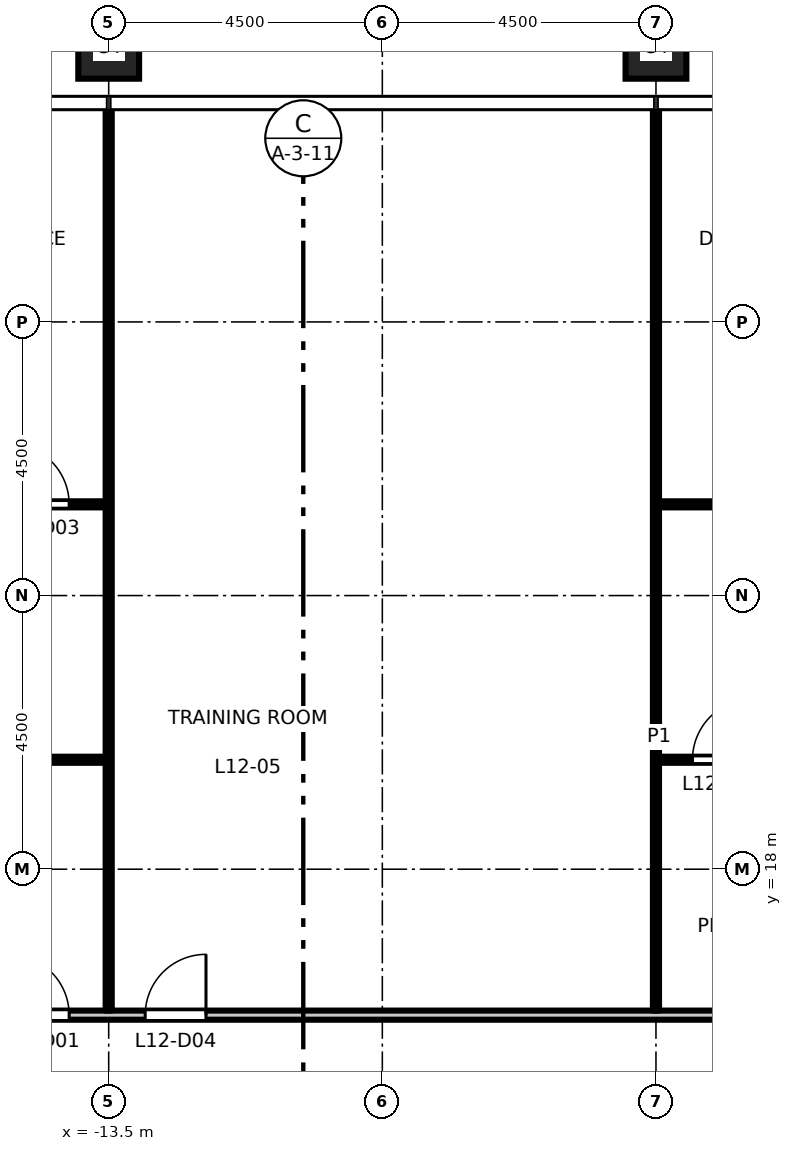
"""IFC4 building model, lengths in metres.
Left out: names, types, materials, properties, quantities, classifications, styles, units other than length and angle.
Written with IfcOpenShell. Run it as: python <this file> out.ifc"""

import sys

from ifc_helpers import new_model, si_unit, direction, frame, frame_2d, origin, origin_2d, place, context, subcontext, project, spatial, rectangle, hollow_rectangle, extrude, element, fill, save


model = new_model("IFC4")
c1 = context("Model", 3, precision=1e-05, world=origin(), true_north=direction((0.0, 1.0)))
c2 = subcontext(c1, "Body", "Model", "MODEL_VIEW")
j1 = project(units=[si_unit("LENGTHUNIT", "METRE"), si_unit("PLANEANGLEUNIT", "RADIAN")], contexts=[c1])
p1 = place(None, origin())
s1 = spatial("IfcSite", under=j1, at=p1, CompositionType="ELEMENT")
p2 = place(p1, origin())
s2 = spatial("IfcBuilding", under=s1, at=p2, CompositionType="ELEMENT")
p3 = place(p2, frame((0.0, 0.0, 58.2)))
s3 = spatial("IfcBuildingStorey", under=s2, at=p3, CompositionType="ELEMENT", Elevation=58.2)
for number, where, z_axis, x_axis in (
    (1, (-4.5, 31.5, 0.0), (0.0, 0.0, 1.0), (1.0, 0.0, 0.0)),
    (2, (-13.5, 31.5, 0.0), (0.0, 0.0, 1.0), (1.0, 0.0, 0.0)),
):
    element("IfcColumn", number, at=place(p3, frame(where, z_axis=z_axis, x_axis=x_axis)), inside=s3, PredefinedType="COLUMN", context=c2, shape_type="SweptSolid", body=[
        extrude(hollow_rectangle(XDim=1.0, YDim=1.0, WallThickness=0.06, at=origin_2d()), origin(), (0.0, 0.0, 1.0), 4.5),
    ])
p4 = place(p3, frame((-23.925, 15.6, 0.0), z_axis=(0.0, 0.0, 1.0), x_axis=(1.0, 0.0, 0.0)))
e3 = element("IfcWall", 3, at=p4, inside=s3, PredefinedType="PARTITIONING", context=c2, shape_type="SweptSolid", body=[
    extrude(rectangle(XDim=47.85, YDim=0.15, at=frame_2d((23.925, 0.0))), origin(), (0.0, 0.0, 1.0), 4.35),
])
p5 = place(p4, frame((8.775, 0.0, 0.0)))
e4 = element("IfcOpeningElement", 4, at=p5, cuts=e3, PredefinedType="OPENING", context=c2, shape_type="SweptSolid", body=[
    extrude(rectangle(XDim=1.0, YDim=2.1, at=frame_2d((0.5, 1.05))), frame((0.0, 0.085, 0.0), z_axis=(0.0, -1.0, 0.0), x_axis=(1.0, 0.0, 0.0)), (0.0, 0.0, 1.0), 0.17),
])
p6 = place(p4, frame((11.025, 0.0, 0.0)))
e5 = element("IfcOpeningElement", 5, at=p6, cuts=e3, PredefinedType="OPENING", context=c2, shape_type="SweptSolid", body=[
    extrude(rectangle(XDim=1.0, YDim=2.1, at=frame_2d((0.5, 1.05))), frame((0.0, 0.085, 0.0), z_axis=(0.0, -1.0, 0.0), x_axis=(1.0, 0.0, 0.0)), (0.0, 0.0, 1.0), 0.17),
])
p7 = place(p4, frame((26.775, 0.0, 0.0)))
e6 = element("IfcOpeningElement", 6, at=p7, cuts=e3, PredefinedType="OPENING", context=c2, shape_type="SweptSolid", body=[
    extrude(rectangle(XDim=1.0, YDim=2.1, at=frame_2d((0.5, 1.05))), frame((0.0, 0.085, 0.0), z_axis=(0.0, -1.0, 0.0), x_axis=(1.0, 0.0, 0.0)), (0.0, 0.0, 1.0), 0.17),
])
p8 = place(p4, frame((29.025, 0.0, 0.0)))
e7 = element("IfcOpeningElement", 7, at=p8, cuts=e3, PredefinedType="OPENING", context=c2, shape_type="SweptSolid", body=[
    extrude(rectangle(XDim=1.0, YDim=2.1, at=frame_2d((0.5, 1.05))), frame((0.0, 0.085, 0.0), z_axis=(0.0, -1.0, 0.0), x_axis=(1.0, 0.0, 0.0)), (0.0, 0.0, 1.0), 0.17),
])
p9 = place(p4, frame((38.025, 0.0, 0.0)))
e8 = element("IfcOpeningElement", 8, at=p9, cuts=e3, PredefinedType="OPENING", context=c2, shape_type="SweptSolid", body=[
    extrude(rectangle(XDim=1.0, YDim=2.1, at=frame_2d((0.5, 1.05))), frame((0.0, 0.085, 0.0), z_axis=(0.0, -1.0, 0.0), x_axis=(1.0, 0.0, 0.0)), (0.0, 0.0, 1.0), 0.17),
])
p10 = place(p3, frame((-22.45, 19.8, 0.0), z_axis=(0.0, 0.0, 1.0), x_axis=(1.0, 0.0, 0.0)))
e9 = element("IfcWall", 9, at=p10, inside=s3, PredefinedType="PARTITIONING", context=c2, shape_type="SweptSolid", body=[
    extrude(rectangle(XDim=8.9, YDim=0.1, at=frame_2d((4.45, 0.0))), origin(), (0.0, 0.0, 1.0), 4.35),
])
p11 = place(p10, frame((0.55, 0.0, 0.0)))
e10 = element("IfcOpeningElement", 10, at=p11, cuts=e9, PredefinedType="OPENING", context=c2, shape_type="SweptSolid", body=[
    extrude(rectangle(XDim=1.0, YDim=2.1, at=frame_2d((0.5, 1.05))), frame((0.0, 0.06, 0.0), z_axis=(0.0, -1.0, 0.0), x_axis=(1.0, 0.0, 0.0)), (0.0, 0.0, 1.0), 0.12),
])
p12 = place(p3, frame((-4.45, 19.8, 0.0), z_axis=(0.0, 0.0, 1.0), x_axis=(1.0, 0.0, 0.0)))
e11 = element("IfcWall", 11, at=p12, inside=s3, PredefinedType="PARTITIONING", context=c2, shape_type="SweptSolid", body=[
    extrude(rectangle(XDim=26.9, YDim=0.1, at=frame_2d((13.45, 0.0))), origin(), (0.0, 0.0, 1.0), 4.35),
])
p13 = place(p12, frame((0.55, 0.0, 0.0)))
e12 = element("IfcOpeningElement", 12, at=p13, cuts=e11, PredefinedType="OPENING", context=c2, shape_type="SweptSolid", body=[
    extrude(rectangle(XDim=1.0, YDim=2.1, at=frame_2d((0.5, 1.05))), frame((0.0, 0.06, 0.0), z_axis=(0.0, -1.0, 0.0), x_axis=(1.0, 0.0, 0.0)), (0.0, 0.0, 1.0), 0.12),
])
p14 = place(p12, frame((16.3, 0.0, 0.0)))
e13 = element("IfcOpeningElement", 13, at=p14, cuts=e11, PredefinedType="OPENING", context=c2, shape_type="SweptSolid", body=[
    extrude(rectangle(XDim=1.0, YDim=2.1, at=frame_2d((0.5, 1.05))), frame((0.0, 0.06, 0.0), z_axis=(0.0, -1.0, 0.0), x_axis=(1.0, 0.0, 0.0)), (0.0, 0.0, 1.0), 0.12),
])
p15 = place(p12, frame((25.3, 0.0, 0.0)))
e14 = element("IfcOpeningElement", 14, at=p15, cuts=e11, PredefinedType="OPENING", context=c2, shape_type="SweptSolid", body=[
    extrude(rectangle(XDim=1.0, YDim=2.1, at=frame_2d((0.5, 1.05))), frame((0.0, 0.06, 0.0), z_axis=(0.0, -1.0, 0.0), x_axis=(1.0, 0.0, 0.0)), (0.0, 0.0, 1.0), 0.12),
])
p16 = place(p3, frame((-22.45, 24.0, 0.0), z_axis=(0.0, 0.0, 1.0), x_axis=(1.0, 0.0, 0.0)))
e15 = element("IfcWall", 15, at=p16, inside=s3, PredefinedType="PARTITIONING", context=c2, shape_type="SweptSolid", body=[
    extrude(rectangle(XDim=8.9, YDim=0.1, at=frame_2d((4.45, 0.0))), origin(), (0.0, 0.0, 1.0), 3.85),
])
p17 = place(p16, frame((7.3, 0.0, 0.0)))
e16 = element("IfcOpeningElement", 16, at=p17, cuts=e15, PredefinedType="OPENING", context=c2, shape_type="SweptSolid", body=[
    extrude(rectangle(XDim=1.0, YDim=2.1, at=frame_2d((0.5, 1.05))), frame((0.0, 0.06, 0.0), z_axis=(0.0, -1.0, 0.0), x_axis=(1.0, 0.0, 0.0)), (0.0, 0.0, 1.0), 0.12),
])
p18 = place(p3, frame((-4.45, 24.0, 0.0), z_axis=(0.0, 0.0, 1.0), x_axis=(1.0, 0.0, 0.0)))
e17 = element("IfcWall", 17, at=p18, inside=s3, PredefinedType="PARTITIONING", context=c2, shape_type="SweptSolid", body=[
    extrude(rectangle(XDim=8.9, YDim=0.1, at=frame_2d((4.45, 0.0))), origin(), (0.0, 0.0, 1.0), 3.85),
])
p19 = place(p18, frame((7.3, 0.0, 0.0)))
e18 = element("IfcOpeningElement", 18, at=p19, cuts=e17, PredefinedType="OPENING", context=c2, shape_type="SweptSolid", body=[
    extrude(rectangle(XDim=1.0, YDim=2.1, at=frame_2d((0.5, 1.05))), frame((0.0, 0.06, 0.0), z_axis=(0.0, -1.0, 0.0), x_axis=(1.0, 0.0, 0.0)), (0.0, 0.0, 1.0), 0.12),
])
for number, where, z_axis, x_axis in (
    (19, (-13.5, 15.675, 0.0), (0.0, 0.0, 1.0), (0.0, 1.0, 0.0)),
    (20, (-4.5, 15.675, 0.0), (0.0, 0.0, 1.0), (0.0, 1.0, 0.0)),
):
    element("IfcWall", number, at=place(p3, frame(where, z_axis=z_axis, x_axis=x_axis)), inside=s3, PredefinedType="PARTITIONING", context=c2, shape_type="SweptSolid", body=[
        extrude(rectangle(XDim=14.835, YDim=0.1, at=frame_2d((7.417, 0.0))), origin(), (0.0, 0.0, 1.0), 3.35),
    ])
p20 = place(p5, origin())
e21 = element("IfcDoor", 21, at=p20, inside=s3, OperationType="SINGLE_SWING_LEFT", PredefinedType="DOOR", context=c2, shape_type="SweptSolid", body=[
    extrude(rectangle(XDim=1.0, YDim=2.1, at=frame_2d((0.5, 1.05))), frame((0.0, 0.025, 0.0), z_axis=(0.0, -1.0, 0.0), x_axis=(1.0, 0.0, 0.0)), (0.0, 0.0, 1.0), 0.05),
])
fill(e4, e21)
p21 = place(p17, origin())
e22 = element("IfcDoor", 22, at=p21, inside=s3, OperationType="SINGLE_SWING_LEFT", PredefinedType="DOOR", context=c2, shape_type="SweptSolid", body=[
    extrude(rectangle(XDim=1.0, YDim=2.1, at=frame_2d((0.5, 1.05))), frame((0.0, 0.025, 0.0), z_axis=(0.0, -1.0, 0.0), x_axis=(1.0, 0.0, 0.0)), (0.0, 0.0, 1.0), 0.05),
])
fill(e16, e22)
p22 = place(p6, origin())
e23 = element("IfcDoor", 23, at=p22, inside=s3, OperationType="SINGLE_SWING_RIGHT", PredefinedType="DOOR", context=c2, shape_type="SweptSolid", body=[
    extrude(rectangle(XDim=1.0, YDim=2.1, at=frame_2d((0.5, 1.05))), frame((0.0, 0.025, 0.0), z_axis=(0.0, -1.0, 0.0), x_axis=(1.0, 0.0, 0.0)), (0.0, 0.0, 1.0), 0.05),
])
fill(e5, e23)
p23 = place(p13, origin())
e24 = element("IfcDoor", 24, at=p23, inside=s3, OperationType="SINGLE_SWING_RIGHT", PredefinedType="DOOR", context=c2, shape_type="SweptSolid", body=[
    extrude(rectangle(XDim=1.0, YDim=2.1, at=frame_2d((0.5, 1.05))), frame((0.0, 0.025, 0.0), z_axis=(0.0, -1.0, 0.0), x_axis=(1.0, 0.0, 0.0)), (0.0, 0.0, 1.0), 0.05),
])
fill(e12, e24)
save(model, sys.argv[1])
